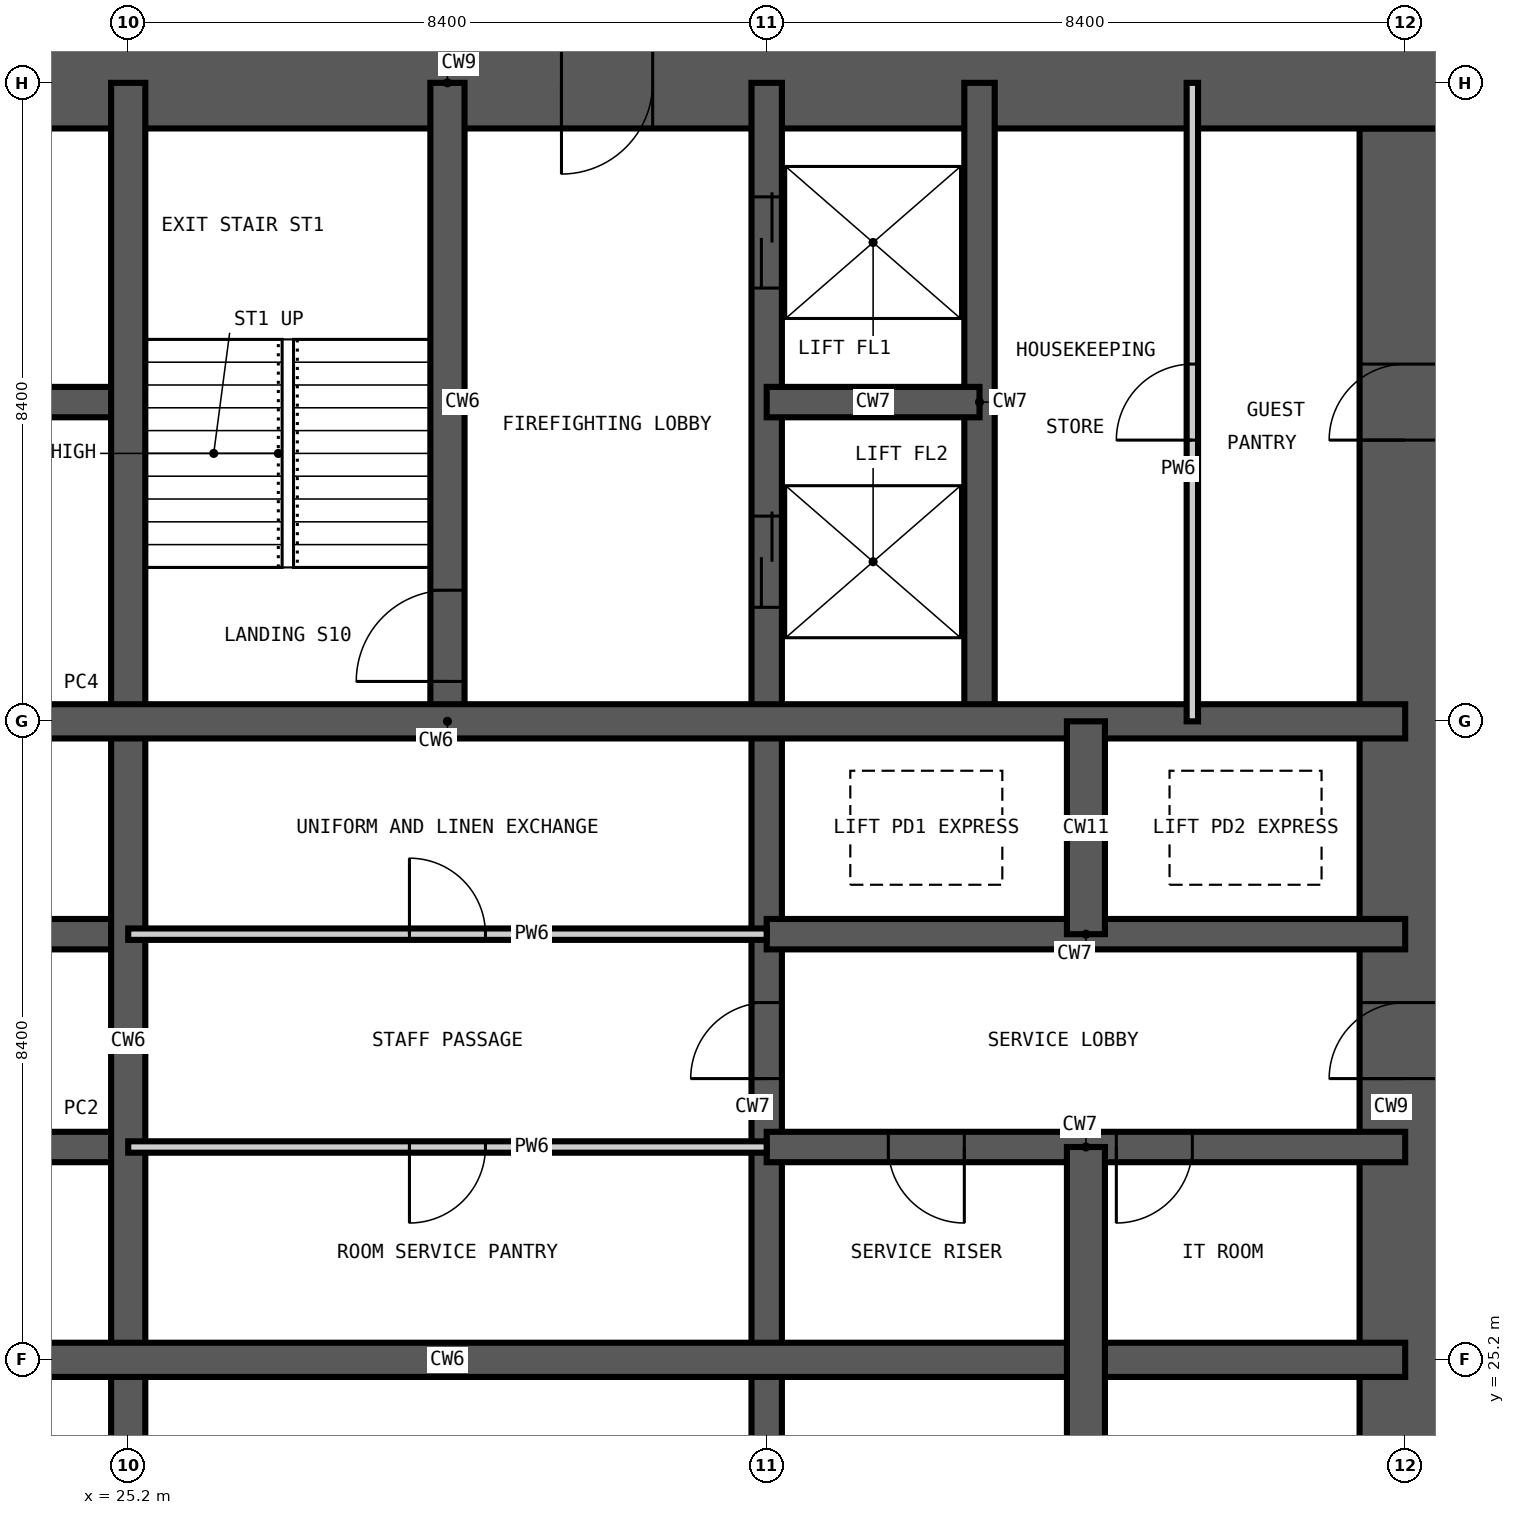
"""IFC4 building model, lengths in metres.
Left out: names, types, materials, properties, quantities, classifications, styles, units other than length and angle.
Written with IfcOpenShell. Run it as: python <this file> out.ifc"""

import sys

from ifc_helpers import new_model, si_unit, direction, frame, frame_2d, origin, place, context, subcontext, project, spatial, rectangle, extrude, element, fill, save


model = new_model("IFC4")
c1 = context("Model", 3, precision=1e-05, world=origin(), true_north=direction((0.0, 1.0)))
c2 = subcontext(c1, "Body", "Model", "MODEL_VIEW")
j1 = project(units=[si_unit("LENGTHUNIT", "METRE"), si_unit("PLANEANGLEUNIT", "RADIAN")], contexts=[c1])
p1 = place(None, origin())
s1 = spatial("IfcSite", under=j1, at=p1, CompositionType="ELEMENT")
p2 = place(p1, origin())
s2 = spatial("IfcBuilding", under=s1, at=p2, CompositionType="ELEMENT")
p3 = place(p2, frame((0.0, 0.0, 162.6)))
s3 = spatial("IfcBuildingStorey", under=s2, at=p3, CompositionType="ELEMENT", Elevation=162.6)
p4 = place(p3, frame((42.0, 17.4, -0.35), z_axis=(0.0, 0.0, 1.0), x_axis=(0.0, 1.0, 0.0)))
e1 = element("IfcWall", 1, at=p4, inside=s3, PredefinedType="SHEAR", context=c2, shape_type="SweptSolid", body=[
    extrude(rectangle(XDim=24.0, YDim=1.2, at=frame_2d((12.0, 0.0))), origin(), (0.0, 0.0, 1.0), 3.6),
])
p5 = place(p4, frame((0.2, 0.0, 0.35)))
e2 = element("IfcOpeningElement", 2, at=p5, cuts=e1, PredefinedType="OPENING", context=c2, shape_type="SweptSolid", body=[
    extrude(rectangle(XDim=1.2, YDim=2.2, at=frame_2d((0.6, 1.1))), frame((0.0, 0.61, 0.0), z_axis=(0.0, -1.0, 0.0), x_axis=(1.0, 0.0, 0.0)), (0.0, 0.0, 1.0), 1.22),
])
p6 = place(p4, frame((11.5, 0.0, 0.35)))
e3 = element("IfcOpeningElement", 3, at=p6, cuts=e1, PredefinedType="OPENING", context=c2, shape_type="SweptSolid", body=[
    extrude(rectangle(XDim=1.0, YDim=2.1, at=frame_2d((0.5, 1.05))), frame((0.0, 0.61, 0.0), z_axis=(0.0, -1.0, 0.0), x_axis=(1.0, 0.0, 0.0)), (0.0, 0.0, 1.0), 1.22),
])
p7 = place(p4, frame((19.9, 0.0, 0.35)))
e4 = element("IfcOpeningElement", 4, at=p7, cuts=e1, PredefinedType="OPENING", context=c2, shape_type="SweptSolid", body=[
    extrude(rectangle(XDim=1.0, YDim=2.1, at=frame_2d((0.5, 1.05))), frame((0.0, 0.61, 0.0), z_axis=(0.0, -1.0, 0.0), x_axis=(1.0, 0.0, 0.0)), (0.0, 0.0, 1.0), 1.22),
])
p8 = place(p3, frame((42.6, 42.0, -0.35), z_axis=(0.0, 0.0, 1.0), x_axis=(-1.0, 0.0, 0.0)))
e5 = element("IfcWall", 5, at=p8, inside=s3, PredefinedType="SHEAR", context=c2, shape_type="SweptSolid", body=[
    extrude(rectangle(XDim=26.4, YDim=1.2, at=frame_2d((13.2, 0.0))), origin(), (0.0, 0.0, 1.0), 3.6),
])
p9 = place(p8, frame((21.1, 0.0, 0.35)))
e6 = element("IfcOpeningElement", 6, at=p9, cuts=e5, PredefinedType="OPENING", context=c2, shape_type="SweptSolid", body=[
    extrude(rectangle(XDim=1.0, YDim=2.1, at=frame_2d((0.5, 1.05))), frame((0.0, 0.61, 0.0), z_axis=(0.0, -1.0, 0.0), x_axis=(1.0, 0.0, 0.0)), (0.0, 0.0, 1.0), 1.22),
])
p10 = place(p8, frame((10.5, 0.0, 0.35)))
e7 = element("IfcOpeningElement", 7, at=p10, cuts=e5, PredefinedType="OPENING", context=c2, shape_type="SweptSolid", body=[
    extrude(rectangle(XDim=1.2, YDim=2.2, at=frame_2d((0.6, 1.1))), frame((0.0, 0.61, 0.0), z_axis=(0.0, -1.0, 0.0), x_axis=(1.0, 0.0, 0.0)), (0.0, 0.0, 1.0), 1.22),
])
p11 = place(p3, frame((33.6, 16.8, -0.35), z_axis=(0.0, 0.0, 1.0), x_axis=(0.0, 1.0, 0.0)))
e8 = element("IfcWall", 8, at=p11, inside=s3, PredefinedType="SHEAR", context=c2, shape_type="SweptSolid", body=[
    extrude(rectangle(XDim=25.2, YDim=0.4, at=frame_2d((12.6, 0.0))), origin(), (0.0, 0.0, 1.0), 3.6),
])
p12 = place(p11, frame((22.5, 0.0, 0.35)))
e9 = element("IfcOpeningElement", 9, at=p12, cuts=e8, PredefinedType="OPENING", context=c2, shape_type="SweptSolid", body=[
    extrude(rectangle(XDim=1.2, YDim=2.2, at=frame_2d((0.6, 1.1))), frame((0.0, 0.21, 0.0), z_axis=(0.0, -1.0, 0.0), x_axis=(1.0, 0.0, 0.0)), (0.0, 0.0, 1.0), 0.42),
])
p13 = place(p11, frame((18.3, 0.0, 0.35)))
e10 = element("IfcOpeningElement", 10, at=p13, cuts=e8, PredefinedType="OPENING", context=c2, shape_type="SweptSolid", body=[
    extrude(rectangle(XDim=1.2, YDim=2.2, at=frame_2d((0.6, 1.1))), frame((0.0, 0.21, 0.0), z_axis=(0.0, -1.0, 0.0), x_axis=(1.0, 0.0, 0.0)), (0.0, 0.0, 1.0), 0.42),
])
p14 = place(p11, frame((12.1, 0.0, 0.35)))
e11 = element("IfcOpeningElement", 11, at=p14, cuts=e8, PredefinedType="OPENING", context=c2, shape_type="SweptSolid", body=[
    extrude(rectangle(XDim=1.0, YDim=2.1, at=frame_2d((0.5, 1.05))), frame((0.0, 0.21, 0.0), z_axis=(0.0, -1.0, 0.0), x_axis=(1.0, 0.0, 0.0)), (0.0, 0.0, 1.0), 0.42),
])
p15 = place(p3, frame((36.4, 33.6, -0.35), z_axis=(0.0, 0.0, 1.0), x_axis=(0.0, 1.0, 0.0)))
e12 = element("IfcWall", 12, at=p15, inside=s3, PredefinedType="SHEAR", context=c2, shape_type="SweptSolid", body=[
    extrude(rectangle(XDim=8.4, YDim=0.4, at=frame_2d((4.2, 0.0))), origin(), (0.0, 0.0, 1.0), 3.6),
])
p16 = place(p3, frame((16.8, 28.0, -0.35), z_axis=(0.0, 0.0, 1.0), x_axis=(1.0, 0.0, 0.0)))
e13 = element("IfcWall", 13, at=p16, inside=s3, PredefinedType="SHEAR", context=c2, shape_type="SweptSolid", body=[
    extrude(rectangle(XDim=8.4, YDim=0.4, at=frame_2d((4.2, 0.0))), origin(), (0.0, 0.0, 1.0), 3.6),
])
p17 = place(p16, frame((1.55, 0.0, 0.35)))
e14 = element("IfcOpeningElement", 14, at=p17, cuts=e13, PredefinedType="OPENING", context=c2, shape_type="SweptSolid", body=[
    extrude(rectangle(XDim=1.1, YDim=2.2, at=frame_2d((0.55, 1.1))), frame((0.0, 0.21, 0.0), z_axis=(0.0, -1.0, 0.0), x_axis=(1.0, 0.0, 0.0)), (0.0, 0.0, 1.0), 0.42),
])
p18 = place(p16, frame((5.75, 0.0, 0.35)))
e15 = element("IfcOpeningElement", 15, at=p18, cuts=e13, PredefinedType="OPENING", context=c2, shape_type="SweptSolid", body=[
    extrude(rectangle(XDim=1.1, YDim=2.2, at=frame_2d((0.55, 1.1))), frame((0.0, 0.21, 0.0), z_axis=(0.0, -1.0, 0.0), x_axis=(1.0, 0.0, 0.0)), (0.0, 0.0, 1.0), 0.42),
])
p19 = place(p3, frame((33.6, 28.0, -0.35), z_axis=(0.0, 0.0, 1.0), x_axis=(1.0, 0.0, 0.0)))
e16 = element("IfcWall", 16, at=p19, inside=s3, PredefinedType="SHEAR", context=c2, shape_type="SweptSolid", body=[
    extrude(rectangle(XDim=8.4, YDim=0.4, at=frame_2d((4.2, 0.0))), origin(), (0.0, 0.0, 1.0), 3.6),
])
p20 = place(p19, frame((1.6, 0.0, 0.35)))
e17 = element("IfcOpeningElement", 17, at=p20, cuts=e16, PredefinedType="OPENING", context=c2, shape_type="SweptSolid", body=[
    extrude(rectangle(XDim=1.0, YDim=2.1, at=frame_2d((0.5, 1.05))), frame((0.0, 0.21, 0.0), z_axis=(0.0, -1.0, 0.0), x_axis=(1.0, 0.0, 0.0)), (0.0, 0.0, 1.0), 0.42),
])
p21 = place(p19, frame((4.6, 0.0, 0.35)))
e18 = element("IfcOpeningElement", 18, at=p21, cuts=e16, PredefinedType="OPENING", context=c2, shape_type="SweptSolid", body=[
    extrude(rectangle(XDim=1.0, YDim=2.1, at=frame_2d((0.5, 1.05))), frame((0.0, 0.21, 0.0), z_axis=(0.0, -1.0, 0.0), x_axis=(1.0, 0.0, 0.0)), (0.0, 0.0, 1.0), 0.42),
])
p22 = place(p3, frame((16.8, 30.8, -0.35), z_axis=(0.0, 0.0, 1.0), x_axis=(1.0, 0.0, 0.0)))
e19 = element("IfcWall", 19, at=p22, inside=s3, PredefinedType="SHEAR", context=c2, shape_type="SweptSolid", body=[
    extrude(rectangle(XDim=8.4, YDim=0.4, at=frame_2d((4.2, 0.0))), origin(), (0.0, 0.0, 1.0), 3.6),
])
p23 = place(p22, frame((1.55, 0.0, 0.35)))
e20 = element("IfcOpeningElement", 20, at=p23, cuts=e19, PredefinedType="OPENING", context=c2, shape_type="SweptSolid", body=[
    extrude(rectangle(XDim=1.1, YDim=2.2, at=frame_2d((0.55, 1.1))), frame((0.0, 0.21, 0.0), z_axis=(0.0, -1.0, 0.0), x_axis=(1.0, 0.0, 0.0)), (0.0, 0.0, 1.0), 0.42),
])
p24 = place(p22, frame((5.75, 0.0, 0.35)))
e21 = element("IfcOpeningElement", 21, at=p24, cuts=e19, PredefinedType="OPENING", context=c2, shape_type="SweptSolid", body=[
    extrude(rectangle(XDim=1.1, YDim=2.2, at=frame_2d((0.55, 1.1))), frame((0.0, 0.21, 0.0), z_axis=(0.0, -1.0, 0.0), x_axis=(1.0, 0.0, 0.0)), (0.0, 0.0, 1.0), 0.42),
])
for number, where, z_axis, x_axis in (
    (22, (33.6, 30.8, -0.35), (0.0, 0.0, 1.0), (1.0, 0.0, 0.0)),
    (23, (16.8, 37.8, -0.35), (0.0, 0.0, 1.0), (1.0, 0.0, 0.0)),
):
    element("IfcWall", number, at=place(p3, frame(where, z_axis=z_axis, x_axis=x_axis)), inside=s3, PredefinedType="SHEAR", context=c2, shape_type="SweptSolid", body=[
        extrude(rectangle(XDim=8.4, YDim=0.4, at=frame_2d((4.2, 0.0))), origin(), (0.0, 0.0, 1.0), 3.6),
    ])
p25 = place(p3, frame((33.6, 37.8, -0.35), z_axis=(0.0, 0.0, 1.0), x_axis=(1.0, 0.0, 0.0)))
e24 = element("IfcWall", 24, at=p25, inside=s3, PredefinedType="SHEAR", context=c2, shape_type="SweptSolid", body=[
    extrude(rectangle(XDim=2.8, YDim=0.4, at=frame_2d((1.4, 0.0))), origin(), (0.0, 0.0, 1.0), 3.6),
])
p26 = place(p3, frame((25.2, 16.8, -0.35), z_axis=(0.0, 0.0, 1.0), x_axis=(0.0, 1.0, 0.0)))
e25 = element("IfcWall", 25, at=p26, inside=s3, PredefinedType="SHEAR", context=c2, shape_type="SweptSolid", body=[
    extrude(rectangle(XDim=25.2, YDim=0.45, at=frame_2d((12.6, 0.0))), origin(), (0.0, 0.0, 1.0), 3.6),
])
p27 = place(p3, frame((29.4, 33.6, -0.35), z_axis=(0.0, 0.0, 1.0), x_axis=(0.0, 1.0, 0.0)))
e26 = element("IfcWall", 26, at=p27, inside=s3, PredefinedType="SHEAR", context=c2, shape_type="SweptSolid", body=[
    extrude(rectangle(XDim=8.4, YDim=0.45, at=frame_2d((4.2, 0.0))), origin(), (0.0, 0.0, 1.0), 3.6),
])
p28 = place(p27, frame((0.525, 0.0, 0.35)))
e27 = element("IfcOpeningElement", 27, at=p28, cuts=e26, PredefinedType="OPENING", context=c2, shape_type="SweptSolid", body=[
    extrude(rectangle(XDim=1.2, YDim=2.2, at=frame_2d((0.6, 1.1))), frame((0.0, 0.235, 0.0), z_axis=(0.0, -1.0, 0.0), x_axis=(1.0, 0.0, 0.0)), (0.0, 0.0, 1.0), 0.47),
])
for number, where, z_axis, x_axis in (
    (28, (16.8, 25.2, -0.35), (0.0, 0.0, 1.0), (1.0, 0.0, 0.0)),
    (29, (16.8, 33.6, -0.35), (0.0, 0.0, 1.0), (1.0, 0.0, 0.0)),
):
    element("IfcWall", number, at=place(p3, frame(where, z_axis=z_axis, x_axis=x_axis)), inside=s3, PredefinedType="SHEAR", context=c2, shape_type="SweptSolid", body=[
        extrude(rectangle(XDim=25.2, YDim=0.45, at=frame_2d((12.6, 0.0))), origin(), (0.0, 0.0, 1.0), 3.6),
    ])
p29 = place(p3, frame((37.8, 16.8, -0.35), z_axis=(0.0, 0.0, 1.0), x_axis=(0.0, 1.0, 0.0)))
e30 = element("IfcWall", 30, at=p29, inside=s3, PredefinedType="SHEAR", context=c2, shape_type="SweptSolid", body=[
    extrude(rectangle(XDim=11.2, YDim=0.5, at=frame_2d((5.6, 0.0))), origin(), (0.0, 0.0, 1.0), 3.6),
])
p30 = place(p3, frame((37.8, 30.8, -0.35), z_axis=(0.0, 0.0, 1.0), x_axis=(0.0, 1.0, 0.0)))
e31 = element("IfcWall", 31, at=p30, inside=s3, PredefinedType="SHEAR", context=c2, shape_type="SweptSolid", body=[
    extrude(rectangle(XDim=2.8, YDim=0.5, at=frame_2d((1.4, 0.0))), origin(), (0.0, 0.0, 1.0), 3.6),
])
p31 = place(p3, frame((39.2, 33.6, 0.0), z_axis=(0.0, 0.0, 1.0), x_axis=(0.0, 1.0, 0.0)))
e32 = element("IfcWall", 32, at=p31, inside=s3, PredefinedType="PARTITIONING", context=c2, shape_type="SweptSolid", body=[
    extrude(rectangle(XDim=8.4, YDim=0.15, at=frame_2d((4.2, 0.0))), origin(), (0.0, 0.0, 1.0), 3.25),
])
p32 = place(p31, frame((3.7, 0.0, 0.0)))
e33 = element("IfcOpeningElement", 33, at=p32, cuts=e32, PredefinedType="OPENING", context=c2, shape_type="SweptSolid", body=[
    extrude(rectangle(XDim=1.0, YDim=2.1, at=frame_2d((0.5, 1.05))), frame((0.0, 0.085, 0.0), z_axis=(0.0, -1.0, 0.0), x_axis=(1.0, 0.0, 0.0)), (0.0, 0.0, 1.0), 0.17),
])
p33 = place(p3, frame((25.2, 28.0, 0.0), z_axis=(0.0, 0.0, 1.0), x_axis=(1.0, 0.0, 0.0)))
e34 = element("IfcWall", 34, at=p33, inside=s3, PredefinedType="PARTITIONING", context=c2, shape_type="SweptSolid", body=[
    extrude(rectangle(XDim=8.4, YDim=0.15, at=frame_2d((4.2, 0.0))), origin(), (0.0, 0.0, 1.0), 3.25),
])
p34 = place(p33, frame((3.7, 0.0, 0.0)))
e35 = element("IfcOpeningElement", 35, at=p34, cuts=e34, PredefinedType="OPENING", context=c2, shape_type="SweptSolid", body=[
    extrude(rectangle(XDim=1.0, YDim=2.1, at=frame_2d((0.5, 1.05))), frame((0.0, 0.085, 0.0), z_axis=(0.0, -1.0, 0.0), x_axis=(1.0, 0.0, 0.0)), (0.0, 0.0, 1.0), 0.17),
])
p35 = place(p3, frame((25.2, 30.8, 0.0), z_axis=(0.0, 0.0, 1.0), x_axis=(1.0, 0.0, 0.0)))
e36 = element("IfcWall", 36, at=p35, inside=s3, PredefinedType="PARTITIONING", context=c2, shape_type="SweptSolid", body=[
    extrude(rectangle(XDim=8.4, YDim=0.15, at=frame_2d((4.2, 0.0))), origin(), (0.0, 0.0, 1.0), 3.25),
])
p36 = place(p35, frame((3.7, 0.0, 0.0)))
e37 = element("IfcOpeningElement", 37, at=p36, cuts=e36, PredefinedType="OPENING", context=c2, shape_type="SweptSolid", body=[
    extrude(rectangle(XDim=1.0, YDim=2.1, at=frame_2d((0.5, 1.05))), frame((0.0, 0.085, 0.0), z_axis=(0.0, -1.0, 0.0), x_axis=(1.0, 0.0, 0.0)), (0.0, 0.0, 1.0), 0.17),
])
p37 = place(p28, origin())
e38 = element("IfcDoor", 38, at=p37, inside=s3, OperationType="SINGLE_SWING_LEFT", PredefinedType="DOOR", context=c2, shape_type="SweptSolid", body=[
    extrude(rectangle(XDim=1.2, YDim=2.2, at=frame_2d((0.6, 1.1))), frame((0.0, 0.025, 0.0), z_axis=(0.0, -1.0, 0.0), x_axis=(1.0, 0.0, 0.0)), (0.0, 0.0, 1.0), 0.05),
])
fill(e27, e38)
p38 = place(p12, origin())
e39 = element("IfcDoor", 39, at=p38, inside=s3, OperationType="DOUBLE_DOOR_SLIDING", PredefinedType="DOOR", context=c2, shape_type="SweptSolid", body=[
    extrude(rectangle(XDim=1.2, YDim=2.2, at=frame_2d((0.6, 1.1))), frame((0.0, 0.025, 0.0), z_axis=(0.0, -1.0, 0.0), x_axis=(1.0, 0.0, 0.0)), (0.0, 0.0, 1.0), 0.05),
])
fill(e9, e39)
p39 = place(p13, origin())
e40 = element("IfcDoor", 40, at=p39, inside=s3, OperationType="DOUBLE_DOOR_SLIDING", PredefinedType="DOOR", context=c2, shape_type="SweptSolid", body=[
    extrude(rectangle(XDim=1.2, YDim=2.2, at=frame_2d((0.6, 1.1))), frame((0.0, 0.025, 0.0), z_axis=(0.0, -1.0, 0.0), x_axis=(1.0, 0.0, 0.0)), (0.0, 0.0, 1.0), 0.05),
])
fill(e10, e40)
p40 = place(p14, origin())
e41 = element("IfcDoor", 41, at=p40, inside=s3, OperationType="SINGLE_SWING_LEFT", PredefinedType="DOOR", context=c2, shape_type="SweptSolid", body=[
    extrude(rectangle(XDim=1.0, YDim=2.1, at=frame_2d((0.5, 1.05))), frame((0.0, 0.025, 0.0), z_axis=(0.0, -1.0, 0.0), x_axis=(1.0, 0.0, 0.0)), (0.0, 0.0, 1.0), 0.05),
])
fill(e11, e41)
p41 = place(p34, frame((1.0, 0.0, 0.0), z_axis=(0.0, 0.0, 1.0), x_axis=(-1.0, 0.0, 0.0)))
e42 = element("IfcDoor", 42, at=p41, inside=s3, OperationType="SINGLE_SWING_RIGHT", PredefinedType="DOOR", context=c2, shape_type="SweptSolid", body=[
    extrude(rectangle(XDim=1.0, YDim=2.1, at=frame_2d((0.5, 1.05))), frame((0.0, 0.025, 0.0), z_axis=(0.0, -1.0, 0.0), x_axis=(1.0, 0.0, 0.0)), (0.0, 0.0, 1.0), 0.05),
])
fill(e35, e42)
p42 = place(p36, origin())
e43 = element("IfcDoor", 43, at=p42, inside=s3, OperationType="SINGLE_SWING_LEFT", PredefinedType="DOOR", context=c2, shape_type="SweptSolid", body=[
    extrude(rectangle(XDim=1.0, YDim=2.1, at=frame_2d((0.5, 1.05))), frame((0.0, 0.025, 0.0), z_axis=(0.0, -1.0, 0.0), x_axis=(1.0, 0.0, 0.0)), (0.0, 0.0, 1.0), 0.05),
])
fill(e37, e43)
p43 = place(p20, frame((1.0, 0.0, 0.0), z_axis=(0.0, 0.0, 1.0), x_axis=(-1.0, 0.0, 0.0)))
e44 = element("IfcDoor", 44, at=p43, inside=s3, OperationType="SINGLE_SWING_LEFT", PredefinedType="DOOR", context=c2, shape_type="SweptSolid", body=[
    extrude(rectangle(XDim=1.0, YDim=2.1, at=frame_2d((0.5, 1.05))), frame((0.0, 0.025, 0.0), z_axis=(0.0, -1.0, 0.0), x_axis=(1.0, 0.0, 0.0)), (0.0, 0.0, 1.0), 0.05),
])
fill(e17, e44)
p44 = place(p21, frame((1.0, 0.0, 0.0), z_axis=(0.0, 0.0, 1.0), x_axis=(-1.0, 0.0, 0.0)))
e45 = element("IfcDoor", 45, at=p44, inside=s3, OperationType="SINGLE_SWING_RIGHT", PredefinedType="DOOR", context=c2, shape_type="SweptSolid", body=[
    extrude(rectangle(XDim=1.0, YDim=2.1, at=frame_2d((0.5, 1.05))), frame((0.0, 0.025, 0.0), z_axis=(0.0, -1.0, 0.0), x_axis=(1.0, 0.0, 0.0)), (0.0, 0.0, 1.0), 0.05),
])
fill(e18, e45)
p45 = place(p6, origin())
e46 = element("IfcDoor", 46, at=p45, inside=s3, OperationType="SINGLE_SWING_LEFT", PredefinedType="DOOR", context=c2, shape_type="SweptSolid", body=[
    extrude(rectangle(XDim=1.0, YDim=2.1, at=frame_2d((0.5, 1.05))), frame((0.0, 0.025, 0.0), z_axis=(0.0, -1.0, 0.0), x_axis=(1.0, 0.0, 0.0)), (0.0, 0.0, 1.0), 0.05),
])
fill(e3, e46)
p46 = place(p10, origin())
e47 = element("IfcDoor", 47, at=p46, inside=s3, OperationType="SINGLE_SWING_RIGHT", PredefinedType="DOOR", context=c2, shape_type="SweptSolid", body=[
    extrude(rectangle(XDim=1.2, YDim=2.2, at=frame_2d((0.6, 1.1))), frame((0.0, 0.025, 0.0), z_axis=(0.0, -1.0, 0.0), x_axis=(1.0, 0.0, 0.0)), (0.0, 0.0, 1.0), 0.05),
])
fill(e7, e47)
p47 = place(p7, origin())
e48 = element("IfcDoor", 48, at=p47, inside=s3, OperationType="SINGLE_SWING_LEFT", PredefinedType="DOOR", context=c2, shape_type="SweptSolid", body=[
    extrude(rectangle(XDim=1.0, YDim=2.1, at=frame_2d((0.5, 1.05))), frame((0.0, 0.025, 0.0), z_axis=(0.0, -1.0, 0.0), x_axis=(1.0, 0.0, 0.0)), (0.0, 0.0, 1.0), 0.05),
])
fill(e4, e48)
p48 = place(p32, origin())
e49 = element("IfcDoor", 49, at=p48, inside=s3, OperationType="SINGLE_SWING_LEFT", PredefinedType="DOOR", context=c2, shape_type="SweptSolid", body=[
    extrude(rectangle(XDim=1.0, YDim=2.1, at=frame_2d((0.5, 1.05))), frame((0.0, 0.025, 0.0), z_axis=(0.0, -1.0, 0.0), x_axis=(1.0, 0.0, 0.0)), (0.0, 0.0, 1.0), 0.05),
])
fill(e33, e49)
save(model, sys.argv[1])
